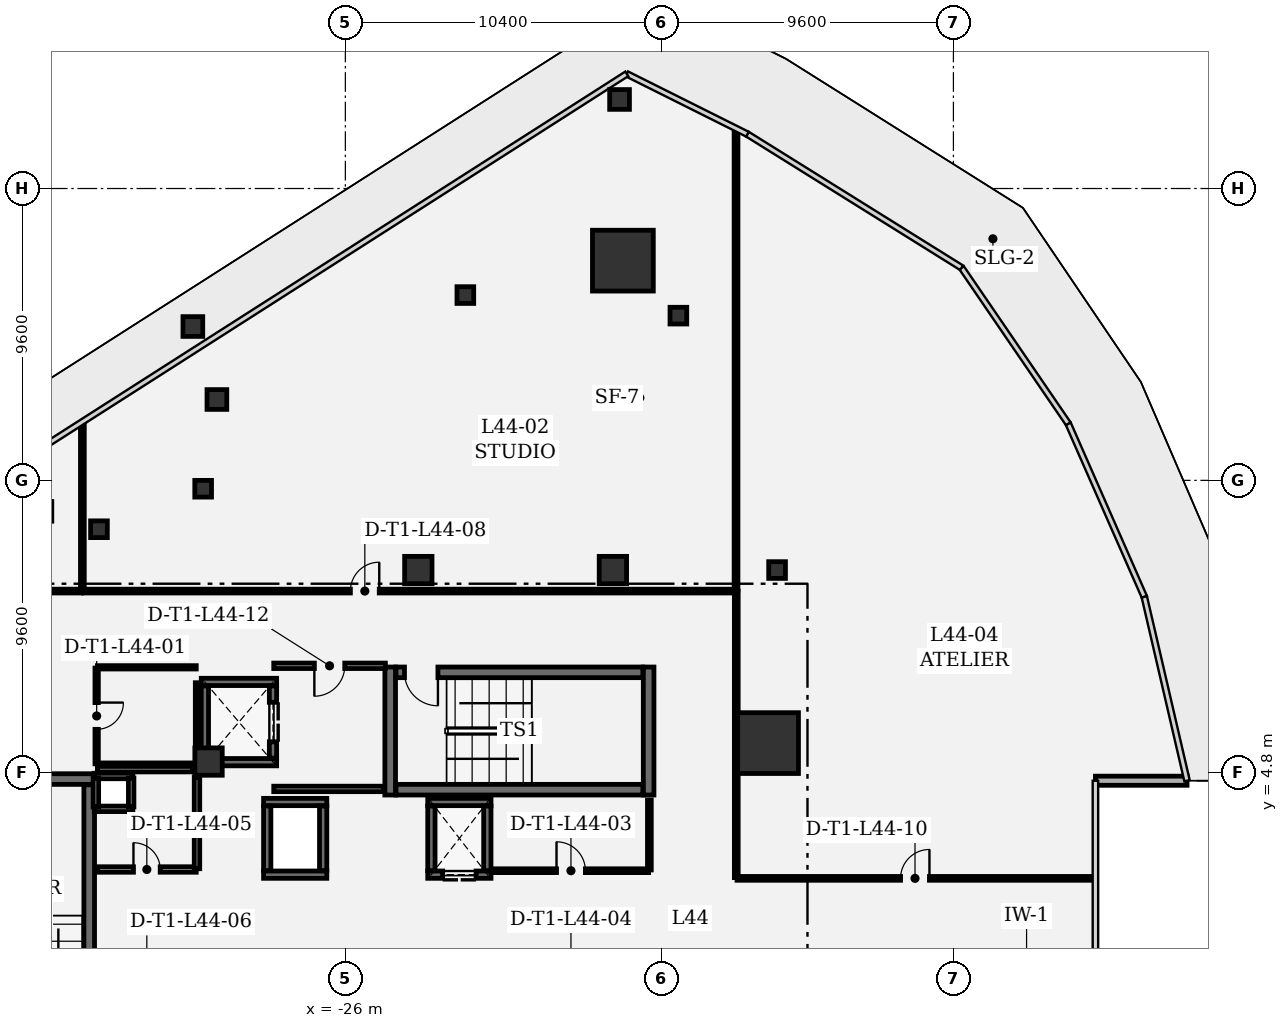
"""IFC4 building model, lengths in metres.
Left out: names, types, materials, properties, quantities, classifications, styles, units other than length and angle.
Written with IfcOpenShell. Run it as: python <this file> out.ifc"""

import sys

from ifc_helpers import new_model, si_unit, direction, frame, frame_2d, origin, origin_2d, place, context, subcontext, project, spatial, rectangle, extrude, element, fill, save


model = new_model("IFC4")
c1 = context("Model", 3, precision=1e-05, world=origin(), true_north=direction((0.0, 1.0)))
c2 = subcontext(c1, "Body", "Model", "MODEL_VIEW")
j1 = project(units=[si_unit("LENGTHUNIT", "METRE"), si_unit("PLANEANGLEUNIT", "RADIAN")], contexts=[c1])
p1 = place(None, origin())
s1 = spatial("IfcSite", under=j1, at=p1, CompositionType="ELEMENT")
p2 = place(p1, origin())
s2 = spatial("IfcBuilding", under=s1, at=p2, CompositionType="ELEMENT")
p3 = place(p2, frame((0.0, 0.0, 192.9)))
s3 = spatial("IfcBuildingStorey", under=s2, at=p3, CompositionType="ELEMENT", Elevation=192.9)
for number, where, z_axis, x_axis in (
    (1, (-12.097, 5.758, 0.0), (0.0, 0.0, 1.0), (1.0, 0.0, 0.0)),
    (2, (-16.872, 21.627, 0.0), (0.0, 0.0, 1.0), (1.0, 0.0, 0.0)),
):
    element("IfcColumn", number, at=place(p3, frame(where, z_axis=z_axis, x_axis=x_axis)), inside=s3, PredefinedType="COLUMN", context=c2, shape_type="SweptSolid", body=[
        extrude(rectangle(XDim=2.0, YDim=2.0, at=origin_2d()), origin(), (0.0, 0.0, 1.0), 4.05),
    ])
for number, where, z_axis, x_axis in (
    (3, (-23.6, 11.45, 0.0), (0.0, 0.0, 1.0), (1.0, 0.0, 0.0)),
    (4, (-17.2, 11.45, 0.0), (0.0, 0.0, 1.0), (1.0, 0.0, 0.0)),
    (5, (-30.5, 5.15, 0.0), (0.0, 0.0, 1.0), (1.0, 0.0, 0.0)),
):
    element("IfcColumn", number, at=place(p3, frame(where, z_axis=z_axis, x_axis=x_axis)), inside=s3, PredefinedType="COLUMN", context=c2, shape_type="SweptSolid", body=[
        extrude(rectangle(XDim=0.9, YDim=0.9, at=origin_2d()), origin(), (0.0, 0.0, 1.0), 4.05),
    ])
for number, where, z_axis, x_axis in (
    (6, (-31.016, 19.46, 0.0), (0.0, 0.0, 1.0), (1.0, 0.0, 0.0)),
    (7, (-16.981, 26.929, 0.0), (0.0, 0.0, 1.0), (1.0, 0.0, 0.0)),
    (8, (-30.225, 17.06, 0.0), (0.0, 0.0, 1.0), (1.0, 0.0, 0.0)),
):
    element("IfcColumn", number, at=place(p3, frame(where, z_axis=z_axis, x_axis=x_axis)), inside=s3, PredefinedType="COLUMN", context=c2, shape_type="SweptSolid", body=[
        extrude(rectangle(XDim=0.65, YDim=0.65, at=origin_2d()), origin(), (0.0, 0.0, 1.0), 4.05),
    ])
for number, where, z_axis, x_axis in (
    (9, (-34.104, 12.792, 0.0), (0.0, 0.0, 1.0), (1.0, 0.0, 0.0)),
    (10, (-22.053, 20.495, 0.0), (0.0, 0.0, 1.0), (1.0, 0.0, 0.0)),
    (11, (-30.677, 14.124, 0.0), (0.0, 0.0, 1.0), (1.0, 0.0, 0.0)),
    (12, (-15.046, 19.818, 0.0), (0.0, 0.0, 1.0), (1.0, 0.0, 0.0)),
    (13, (-11.8, 11.45, 0.0), (0.0, 0.0, 1.0), (1.0, 0.0, 0.0)),
):
    element("IfcColumn", number, at=place(p3, frame(where, z_axis=z_axis, x_axis=x_axis)), inside=s3, PredefinedType="COLUMN", context=c2, shape_type="SweptSolid", body=[
        extrude(rectangle(XDim=0.55, YDim=0.55, at=origin_2d()), origin(), (0.0, 0.0, 1.0), 4.05),
    ])
p4 = place(p3, frame((-1.329, 4.52, 0.0), z_axis=(0.0, 0.0, 1.0), x_axis=(1.0, 0.0, 0.0)))
e14 = element("IfcWall", 14, at=p4, inside=s3, PredefinedType="SOLIDWALL", context=c2, shape_type="SweptSolid", body=[
    extrude(rectangle(XDim=3.013, YDim=0.3, at=frame_2d((1.507, 0.0))), origin(), (0.0, 0.0, 1.0), 3.78),
])
for number, where, z_axis, x_axis in (
    (15, (-24.525, 8.26, 0.0), (0.0, 0.0, 1.0), (0.0, -1.0, 0.0)),
    (16, (-16.025, 4.05, 0.0), (0.0, 0.0, 1.0), (0.0, 1.0, 0.0)),
):
    element("IfcWall", number, at=place(p3, frame(where, z_axis=z_axis, x_axis=x_axis)), inside=s3, PredefinedType="SHEAR", context=c2, shape_type="SweptSolid", body=[
        extrude(rectangle(XDim=4.21, YDim=0.35, at=frame_2d((2.105, 0.0))), origin(), (0.0, 0.0, 1.0), 3.78),
    ])
p5 = place(p3, frame((-24.335, 4.225, 0.0), z_axis=(0.0, 0.0, 1.0), x_axis=(1.0, 0.0, 0.0)))
e17 = element("IfcWall", 17, at=p5, inside=s3, PredefinedType="SHEAR", context=c2, shape_type="SweptSolid", body=[
    extrude(rectangle(XDim=8.12, YDim=0.35, at=frame_2d((4.06, 0.0))), origin(), (0.0, 0.0, 1.0), 3.78),
])
p6 = place(p3, frame((-16.215, 8.085, 0.0), z_axis=(0.0, 0.0, 1.0), x_axis=(-1.0, 0.0, 0.0)))
e18 = element("IfcWall", 18, at=p6, inside=s3, PredefinedType="SHEAR", context=c2, shape_type="SweptSolid", body=[
    extrude(rectangle(XDim=8.12, YDim=0.35, at=frame_2d((4.06, 0.0))), origin(), (0.0, 0.0, 1.0), 3.78),
])
p7 = place(p6, frame((6.74, 0.0, 0.0)))
e19 = element("IfcOpeningElement", 19, at=p7, cuts=e18, PredefinedType="OPENING", context=c2, shape_type="SweptSolid", body=[
    extrude(rectangle(XDim=1.1, YDim=2.2, at=frame_2d((0.55, 1.1))), frame((0.0, 0.185, 0.0), z_axis=(0.0, -1.0, 0.0), x_axis=(1.0, 0.0, 0.0)), (0.0, 0.0, 1.0), 0.37),
])
p8 = place(p3, frame((-34.25, 4.575, 0.0), z_axis=(0.0, 0.0, 1.0), x_axis=(-1.0, 0.0, 0.0)))
e20 = element("IfcWall", 20, at=p8, inside=s3, PredefinedType="SHEAR", context=c2, shape_type="SweptSolid", body=[
    extrude(rectangle(XDim=4.21, YDim=0.35, at=frame_2d((2.105, 0.0))), origin(), (0.0, 0.0, 1.0), 3.78),
])
p9 = place(p3, frame((-34.425, -4.385, 0.0), z_axis=(0.0, 0.0, 1.0), x_axis=(0.0, 1.0, 0.0)))
e21 = element("IfcWall", 21, at=p9, inside=s3, PredefinedType="SHEAR", context=c2, shape_type="SweptSolid", body=[
    extrude(rectangle(XDim=8.77, YDim=0.35, at=frame_2d((4.385, 0.0))), origin(), (0.0, 0.0, 1.0), 3.78),
])
for number, where, z_axis, x_axis in (
    (22, (-28.26, 5.13, 0.0), (0.0, 0.0, 1.0), (-1.0, 0.0, 0.0)),
    (23, (-30.74, 7.77, 0.0), (0.0, 0.0, 1.0), (1.0, 0.0, 0.0)),
):
    element("IfcWall", number, at=place(p3, frame(where, z_axis=z_axis, x_axis=x_axis)), inside=s3, PredefinedType="SHEAR", context=c2, shape_type="SweptSolid", body=[
        extrude(rectangle(XDim=2.48, YDim=0.24, at=frame_2d((1.24, 0.0))), origin(), (0.0, 0.0, 1.0), 3.78),
    ])
p10 = place(p3, frame((-30.62, 5.262, 0.0), z_axis=(0.0, 0.0, 1.0), x_axis=(0.0, 1.0, 0.0)))
e24 = element("IfcWall", 24, at=p10, inside=s3, PredefinedType="SHEAR", context=c2, shape_type="SweptSolid", body=[
    extrude(rectangle(XDim=2.376, YDim=0.24, at=frame_2d((1.188, 0.0))), origin(), (0.0, 0.0, 1.0), 3.78),
])
p11 = place(p3, frame((-28.38, 7.638, 0.0), z_axis=(0.0, 0.0, 1.0), x_axis=(0.0, -1.0, 0.0)))
e25 = element("IfcWall", 25, at=p11, inside=s3, PredefinedType="SHEAR", context=c2, shape_type="SweptSolid", body=[
    extrude(rectangle(XDim=2.376, YDim=0.24, at=frame_2d((1.188, 0.0))), origin(), (0.0, 0.0, 1.0), 3.78),
])
p12 = place(p11, frame((0.538, 0.0, 0.0)))
e26 = element("IfcOpeningElement", 26, at=p12, cuts=e25, PredefinedType="OPENING", context=c2, shape_type="SweptSolid", body=[
    extrude(rectangle(XDim=1.3, YDim=2.3, at=frame_2d((0.65, 1.15))), frame((0.0, 0.13, 0.0), z_axis=(0.0, -1.0, 0.0), x_axis=(1.0, 0.0, 0.0)), (0.0, 0.0, 1.0), 0.26),
])
for number, where, z_axis, x_axis in (
    (27, (-26.61, 1.43, 0.0), (0.0, 0.0, 1.0), (-1.0, 0.0, 0.0)),
    (28, (-28.69, 3.82, 0.0), (0.0, 0.0, 1.0), (1.0, 0.0, 0.0)),
):
    element("IfcWall", number, at=place(p3, frame(where, z_axis=z_axis, x_axis=x_axis)), inside=s3, PredefinedType="SHEAR", context=c2, shape_type="SweptSolid", body=[
        extrude(rectangle(XDim=2.08, YDim=0.24, at=frame_2d((1.04, 0.0))), origin(), (0.0, 0.0, 1.0), 3.78),
    ])
for number, where, z_axis, x_axis in (
    (29, (-28.57, 1.562, 0.0), (0.0, 0.0, 1.0), (0.0, 1.0, 0.0)),
    (30, (-26.73, 3.688, 0.0), (0.0, 0.0, 1.0), (0.0, -1.0, 0.0)),
):
    element("IfcWall", number, at=place(p3, frame(where, z_axis=z_axis, x_axis=x_axis)), inside=s3, PredefinedType="SHEAR", context=c2, shape_type="SweptSolid", body=[
        extrude(rectangle(XDim=2.126, YDim=0.24, at=frame_2d((1.063, 0.0))), origin(), (0.0, 0.0, 1.0), 3.78),
    ])
p13 = place(p3, frame((-21.21, 1.43, 0.0), z_axis=(0.0, 0.0, 1.0), x_axis=(-1.0, 0.0, 0.0)))
e31 = element("IfcWall", 31, at=p13, inside=s3, PredefinedType="SHEAR", context=c2, shape_type="SweptSolid", body=[
    extrude(rectangle(XDim=2.08, YDim=0.24, at=frame_2d((1.04, 0.0))), origin(), (0.0, 0.0, 1.0), 3.78),
])
p14 = place(p13, frame((0.49, 0.0, 0.0)))
e32 = element("IfcOpeningElement", 32, at=p14, cuts=e31, PredefinedType="OPENING", context=c2, shape_type="SweptSolid", body=[
    extrude(rectangle(XDim=1.1, YDim=2.2, at=frame_2d((0.55, 1.1))), frame((0.0, 0.13, 0.0), z_axis=(0.0, -1.0, 0.0), x_axis=(1.0, 0.0, 0.0)), (0.0, 0.0, 1.0), 0.26),
])
p15 = place(p3, frame((-23.29, 3.82, 0.0), z_axis=(0.0, 0.0, 1.0), x_axis=(1.0, 0.0, 0.0)))
e33 = element("IfcWall", 33, at=p15, inside=s3, PredefinedType="SHEAR", context=c2, shape_type="SweptSolid", body=[
    extrude(rectangle(XDim=2.08, YDim=0.24, at=frame_2d((1.04, 0.0))), origin(), (0.0, 0.0, 1.0), 3.78),
])
for number, where, z_axis, x_axis in (
    (34, (-23.17, 1.562, 0.0), (0.0, 0.0, 1.0), (0.0, 1.0, 0.0)),
    (35, (-21.33, 3.688, 0.0), (0.0, 0.0, 1.0), (0.0, -1.0, 0.0)),
):
    element("IfcWall", number, at=place(p3, frame(where, z_axis=z_axis, x_axis=x_axis)), inside=s3, PredefinedType="SHEAR", context=c2, shape_type="SweptSolid", body=[
        extrude(rectangle(XDim=2.126, YDim=0.24, at=frame_2d((1.063, 0.0))), origin(), (0.0, 0.0, 1.0), 3.78),
    ])
for number, where, z_axis, x_axis in (
    (36, (-32.99, 3.595, 0.0), (0.0, 0.0, 1.0), (-1.0, 0.0, 0.0)),
    (37, (-34.26, 4.675, 0.0), (0.0, 0.0, 1.0), (1.0, 0.0, 0.0)),
):
    element("IfcWall", number, at=place(p3, frame(where, z_axis=z_axis, x_axis=x_axis)), inside=s3, PredefinedType="PARTITIONING", context=c2, shape_type="SweptSolid", body=[
        extrude(rectangle(XDim=1.27, YDim=0.18, at=frame_2d((0.635, 0.0))), origin(), (0.0, 0.0, 1.0), 3.78),
    ])
for number, where, z_axis, x_axis in (
    (38, (-34.205, 3.66, 0.0), (0.0, 0.0, 1.0), (0.0, 1.0, 0.0)),
    (39, (-33.045, 4.61, 0.0), (0.0, 0.0, 1.0), (0.0, -1.0, 0.0)),
):
    element("IfcWall", number, at=place(p3, frame(where, z_axis=z_axis, x_axis=x_axis)), inside=s3, PredefinedType="PARTITIONING", context=c2, shape_type="SweptSolid", body=[
        extrude(rectangle(XDim=0.95, YDim=0.18, at=frame_2d((0.475, 0.0))), origin(), (0.0, 0.0, 1.0), 3.78),
    ])
p16 = place(p3, frame((-28.355, 4.25, 0.0), z_axis=(0.0, 0.0, 1.0), x_axis=(1.0, 0.0, 0.0)))
e40 = element("IfcWall", 40, at=p16, inside=s3, PredefinedType="PARTITIONING", context=c2, shape_type="SweptSolid", body=[
    extrude(rectangle(XDim=3.622, YDim=0.18, at=frame_2d((1.811, 0.0))), origin(), (0.0, 0.0, 1.0), 3.78),
])
p17 = place(p3, frame((-24.684, 8.3, 0.0), z_axis=(0.0, 0.0, 1.0), x_axis=(-1.0, 0.0, 0.0)))
e41 = element("IfcWall", 41, at=p17, inside=s3, PredefinedType="PARTITIONING", context=c2, shape_type="SweptSolid", body=[
    extrude(rectangle(XDim=3.671, YDim=0.18, at=frame_2d((1.835, 0.0))), origin(), (0.0, 0.0, 1.0), 3.78),
])
p18 = place(p17, frame((1.335, 0.0, 0.0)))
e42 = element("IfcOpeningElement", 42, at=p18, cuts=e41, PredefinedType="OPENING", context=c2, shape_type="SweptSolid", body=[
    extrude(rectangle(XDim=1.0, YDim=2.15, at=frame_2d((0.5, 1.075))), frame((0.0, 0.1, 0.0), z_axis=(0.0, -1.0, 0.0), x_axis=(1.0, 0.0, 0.0)), (0.0, 0.0, 1.0), 0.2),
])
p19 = place(p3, frame((-34.18, 8.225, 0.0), z_axis=(0.0, 0.0, 1.0), x_axis=(0.0, -1.0, 0.0)))
e43 = element("IfcWall", 43, at=p19, inside=s3, PredefinedType="PARTITIONING", context=c2, shape_type="SweptSolid", body=[
    extrude(rectangle(XDim=3.15, YDim=0.11, at=frame_2d((1.575, 0.0))), origin(), (0.0, 0.0, 1.0), 3.78),
])
p20 = place(p19, frame((1.135, 0.0, 0.0)))
e44 = element("IfcOpeningElement", 44, at=p20, cuts=e43, PredefinedType="OPENING", context=c2, shape_type="SweptSolid", body=[
    extrude(rectangle(XDim=0.88, YDim=2.1, at=frame_2d((0.44, 1.05))), frame((0.0, 0.065, 0.0), z_axis=(0.0, -1.0, 0.0), x_axis=(1.0, 0.0, 0.0)), (0.0, 0.0, 1.0), 0.13),
])
p21 = place(p3, frame((-34.155, 5.05, 0.0), z_axis=(0.0, 0.0, 1.0), x_axis=(1.0, 0.0, 0.0)))
e45 = element("IfcWall", 45, at=p21, inside=s3, PredefinedType="PARTITIONING", context=c2, shape_type="SweptSolid", body=[
    extrude(rectangle(XDim=3.14, YDim=0.11, at=frame_2d((1.57, 0.0))), origin(), (0.0, 0.0, 1.0), 3.78),
])
p22 = place(p3, frame((-30.88, 5.665, 0.0), z_axis=(0.0, 0.0, 1.0), x_axis=(0.0, 1.0, 0.0)))
e46 = element("IfcWall", 46, at=p22, inside=s3, PredefinedType="PARTITIONING", context=c2, shape_type="SweptSolid", body=[
    extrude(rectangle(XDim=2.078, YDim=0.11, at=frame_2d((1.039, 0.0))), origin(), (0.0, 0.0, 1.0), 3.78),
])
p23 = place(p3, frame((-30.905, 8.25, 0.0), z_axis=(0.0, 0.0, 1.0), x_axis=(-1.0, 0.0, 0.0)))
e47 = element("IfcWall", 47, at=p23, inside=s3, PredefinedType="PARTITIONING", context=c2, shape_type="SweptSolid", body=[
    extrude(rectangle(XDim=3.25, YDim=0.11, at=frame_2d((1.625, 0.0))), origin(), (0.0, 0.0, 1.0), 3.78),
])
p24 = place(p3, frame((-21.134, 1.56, 0.0), z_axis=(0.0, 0.0, 1.0), x_axis=(1.0, 0.0, 0.0)))
e48 = element("IfcWall", 48, at=p24, inside=s3, PredefinedType="PARTITIONING", context=c2, shape_type="SweptSolid", body=[
    extrude(rectangle(XDim=5.109, YDim=0.125, at=frame_2d((2.554, 0.0))), origin(), (0.0, 0.0, 1.0), 3.78),
])
p25 = place(p24, frame((2.079, 0.0, 0.0)))
e49 = element("IfcOpeningElement", 49, at=p25, cuts=e48, PredefinedType="OPENING", context=c2, shape_type="SweptSolid", body=[
    extrude(rectangle(XDim=0.95, YDim=2.15, at=frame_2d((0.475, 1.075))), frame((0.0, 0.073, 0.0), z_axis=(0.0, -1.0, 0.0), x_axis=(1.0, 0.0, 0.0)), (0.0, 0.0, 1.0), 0.145),
])
p26 = place(p3, frame((-16.0, 1.585, 0.0), z_axis=(0.0, 0.0, 1.0), x_axis=(0.0, 1.0, 0.0)))
e50 = element("IfcWall", 50, at=p26, inside=s3, PredefinedType="PARTITIONING", context=c2, shape_type="SweptSolid", body=[
    extrude(rectangle(XDim=2.302, YDim=0.125, at=frame_2d((1.151, 0.0))), origin(), (0.0, 0.0, 1.0), 3.78),
])
p27 = place(p3, frame((-34.155, 1.6, 0.0), z_axis=(0.0, 0.0, 1.0), x_axis=(1.0, 0.0, 0.0)))
e51 = element("IfcWall", 51, at=p27, inside=s3, PredefinedType="PARTITIONING", context=c2, shape_type="SweptSolid", body=[
    extrude(rectangle(XDim=3.25, YDim=0.18, at=frame_2d((1.625, 0.0))), origin(), (0.0, 0.0, 1.0), 3.78),
])
p28 = place(p27, frame((1.185, 0.0, 0.0)))
e52 = element("IfcOpeningElement", 52, at=p28, cuts=e51, PredefinedType="OPENING", context=c2, shape_type="SweptSolid", body=[
    extrude(rectangle(XDim=0.88, YDim=2.1, at=frame_2d((0.44, 1.05))), frame((0.0, 0.1, 0.0), z_axis=(0.0, -1.0, 0.0), x_axis=(1.0, 0.0, 0.0)), (0.0, 0.0, 1.0), 0.2),
])
p29 = place(p3, frame((-30.88, 1.625, 0.0), z_axis=(0.0, 0.0, 1.0), x_axis=(0.0, 1.0, 0.0)))
e53 = element("IfcWall", 53, at=p29, inside=s3, PredefinedType="PARTITIONING", context=c2, shape_type="SweptSolid", body=[
    extrude(rectangle(XDim=3.01, YDim=0.18, at=frame_2d((1.505, 0.0))), origin(), (0.0, 0.0, 1.0), 3.78),
])
p30 = place(p3, frame((-31.015, 4.9, 0.0), z_axis=(0.0, 0.0, 1.0), x_axis=(-1.0, 0.0, 0.0)))
e54 = element("IfcWall", 54, at=p30, inside=s3, PredefinedType="PARTITIONING", context=c2, shape_type="SweptSolid", body=[
    extrude(rectangle(XDim=3.14, YDim=0.18, at=frame_2d((1.57, 0.0))), origin(), (0.0, 0.0, 1.0), 3.78),
])
p31 = place(p3, frame((-34.675, 10.758, 0.0), z_axis=(0.0, 0.0, 1.0), x_axis=(-1.0, 0.0, 0.0)))
e55 = element("IfcWall", 55, at=p31, inside=s3, PredefinedType="PARTITIONING", context=c2, shape_type="SweptSolid", body=[
    extrude(rectangle(XDim=3.158, YDim=0.125, at=frame_2d((1.579, 0.0))), origin(), (0.0, 0.0, 1.0), 2.9),
])
p32 = place(p3, frame((-34.65, 10.783, 0.0), z_axis=(0.0, 0.0, 1.0), x_axis=(0.0, 1.0, 0.0)))
e56 = element("IfcWall", 56, at=p32, inside=s3, PredefinedType="PARTITIONING", context=c2, shape_type="SweptSolid", body=[
    extrude(rectangle(XDim=5.463, YDim=0.125, at=frame_2d((2.731, 0.0))), origin(), (0.0, 0.0, 1.0), 3.78),
])
p33 = place(p3, frame((-34.617, 10.758, 0.0), z_axis=(0.0, 0.0, 1.0), x_axis=(1.0, 0.0, 0.0)))
e57 = element("IfcWall", 57, at=p33, inside=s3, PredefinedType="PARTITIONING", context=c2, shape_type="SweptSolid", body=[
    extrude(rectangle(XDim=21.442, YDim=0.125, at=frame_2d((10.721, 0.0))), origin(), (0.0, 0.0, 1.0), 2.9),
])
p34 = place(p33, frame((8.782, 0.0, 0.0)))
e58 = element("IfcOpeningElement", 58, at=p34, cuts=e57, PredefinedType="OPENING", context=c2, shape_type="SweptSolid", body=[
    extrude(rectangle(XDim=0.95, YDim=2.15, at=frame_2d((0.475, 1.075))), frame((0.0, 0.073, 0.0), z_axis=(0.0, -1.0, 0.0), x_axis=(1.0, 0.0, 0.0)), (0.0, 0.0, 1.0), 0.145),
])
p35 = place(p3, frame((-13.15, 10.783, 0.0), z_axis=(0.0, 0.0, 1.0), x_axis=(0.0, 1.0, 0.0)))
e59 = element("IfcWall", 59, at=p35, inside=s3, PredefinedType="PARTITIONING", context=c2, shape_type="SweptSolid", body=[
    extrude(rectangle(XDim=15.111, YDim=0.125, at=frame_2d((7.556, 0.0))), origin(), (0.0, 0.0, 1.0), 2.9),
])
p36 = place(p3, frame((-13.142, 10.758, 0.0), z_axis=(0.0, 0.0, 1.0), x_axis=(0.0, -1.0, 0.0)))
e60 = element("IfcWall", 60, at=p36, inside=s3, PredefinedType="PARTITIONING", context=c2, shape_type="SweptSolid", body=[
    extrude(rectangle(XDim=9.425, YDim=0.125, at=frame_2d((4.713, 0.0))), origin(), (0.0, 0.0, 1.0), 2.9),
])
p37 = place(p3, frame((-13.117, 1.308, 0.0), z_axis=(0.0, 0.0, 1.0), x_axis=(1.0, 0.0, 0.0)))
e61 = element("IfcWall", 61, at=p37, inside=s3, PredefinedType="PARTITIONING", context=c2, shape_type="SweptSolid", body=[
    extrude(rectangle(XDim=11.708, YDim=0.125, at=frame_2d((5.854, 0.0))), origin(), (0.0, 0.0, 1.0), 3.78),
])
p38 = place(p37, frame((5.379, 0.0, 0.0)))
e62 = element("IfcOpeningElement", 62, at=p38, cuts=e61, PredefinedType="OPENING", context=c2, shape_type="SweptSolid", body=[
    extrude(rectangle(XDim=0.95, YDim=2.15, at=frame_2d((0.475, 1.075))), frame((0.0, 0.073, 0.0), z_axis=(0.0, -1.0, 0.0), x_axis=(1.0, 0.0, 0.0)), (0.0, 0.0, 1.0), 0.145),
])
p39 = place(p7, origin())
e63 = element("IfcDoor", 63, at=p39, inside=s3, OperationType="SINGLE_SWING_LEFT", PredefinedType="DOOR", context=c2, shape_type="SweptSolid", body=[
    extrude(rectangle(XDim=1.1, YDim=2.2, at=frame_2d((0.55, 1.1))), frame((0.0, 0.025, 0.0), z_axis=(0.0, -1.0, 0.0), x_axis=(1.0, 0.0, 0.0)), (0.0, 0.0, 1.0), 0.05),
])
fill(e19, e63)
p40 = place(p12, origin())
e64 = element("IfcDoor", 64, at=p40, inside=s3, OperationType="DOUBLE_DOOR_SLIDING", PredefinedType="DOOR", context=c2, shape_type="SweptSolid", body=[
    extrude(rectangle(XDim=1.3, YDim=2.3, at=frame_2d((0.65, 1.15))), frame((0.0, 0.025, 0.0), z_axis=(0.0, -1.0, 0.0), x_axis=(1.0, 0.0, 0.0)), (0.0, 0.0, 1.0), 0.05),
])
fill(e26, e64)
p41 = place(p14, origin())
e65 = element("IfcDoor", 65, at=p41, inside=s3, OperationType="DOUBLE_DOOR_SLIDING", PredefinedType="DOOR", context=c2, shape_type="SweptSolid", body=[
    extrude(rectangle(XDim=1.1, YDim=2.2, at=frame_2d((0.55, 1.1))), frame((0.0, 0.025, 0.0), z_axis=(0.0, -1.0, 0.0), x_axis=(1.0, 0.0, 0.0)), (0.0, 0.0, 1.0), 0.05),
])
fill(e32, e65)
p42 = place(p20, origin())
e66 = element("IfcDoor", 66, at=p42, inside=s3, OperationType="SINGLE_SWING_LEFT", PredefinedType="DOOR", context=c2, shape_type="SweptSolid", body=[
    extrude(rectangle(XDim=0.88, YDim=2.1, at=frame_2d((0.44, 1.05))), frame((0.0, 0.025, 0.0), z_axis=(0.0, -1.0, 0.0), x_axis=(1.0, 0.0, 0.0)), (0.0, 0.0, 1.0), 0.05),
])
fill(e44, e66)
p43 = place(p25, origin())
e67 = element("IfcDoor", 67, at=p43, inside=s3, OperationType="SINGLE_SWING_LEFT", PredefinedType="DOOR", context=c2, shape_type="SweptSolid", body=[
    extrude(rectangle(XDim=0.95, YDim=2.15, at=frame_2d((0.475, 1.075))), frame((0.0, 0.025, 0.0), z_axis=(0.0, -1.0, 0.0), x_axis=(1.0, 0.0, 0.0)), (0.0, 0.0, 1.0), 0.05),
])
fill(e49, e67)
p44 = place(p28, origin())
e68 = element("IfcDoor", 68, at=p44, inside=s3, OperationType="SINGLE_SWING_LEFT", PredefinedType="DOOR", context=c2, shape_type="SweptSolid", body=[
    extrude(rectangle(XDim=0.88, YDim=2.1, at=frame_2d((0.44, 1.05))), frame((0.0, 0.025, 0.0), z_axis=(0.0, -1.0, 0.0), x_axis=(1.0, 0.0, 0.0)), (0.0, 0.0, 1.0), 0.05),
])
fill(e52, e68)
p45 = place(p34, origin())
e69 = element("IfcDoor", 69, at=p45, inside=s3, OperationType="SINGLE_SWING_RIGHT", PredefinedType="DOOR", context=c2, shape_type="SweptSolid", body=[
    extrude(rectangle(XDim=0.95, YDim=2.15, at=frame_2d((0.475, 1.075))), frame((0.0, 0.025, 0.0), z_axis=(0.0, -1.0, 0.0), x_axis=(1.0, 0.0, 0.0)), (0.0, 0.0, 1.0), 0.05),
])
fill(e58, e69)
p46 = place(p38, origin())
e70 = element("IfcDoor", 70, at=p46, inside=s3, OperationType="SINGLE_SWING_RIGHT", PredefinedType="DOOR", context=c2, shape_type="SweptSolid", body=[
    extrude(rectangle(XDim=0.95, YDim=2.15, at=frame_2d((0.475, 1.075))), frame((0.0, 0.025, 0.0), z_axis=(0.0, -1.0, 0.0), x_axis=(1.0, 0.0, 0.0)), (0.0, 0.0, 1.0), 0.05),
])
fill(e62, e70)
p47 = place(p18, origin())
e71 = element("IfcDoor", 71, at=p47, inside=s3, OperationType="SINGLE_SWING_RIGHT", PredefinedType="DOOR", context=c2, shape_type="SweptSolid", body=[
    extrude(rectangle(XDim=1.0, YDim=2.15, at=frame_2d((0.5, 1.075))), frame((0.0, 0.025, 0.0), z_axis=(0.0, -1.0, 0.0), x_axis=(1.0, 0.0, 0.0)), (0.0, 0.0, 1.0), 0.05),
])
fill(e42, e71)
save(model, sys.argv[1])
